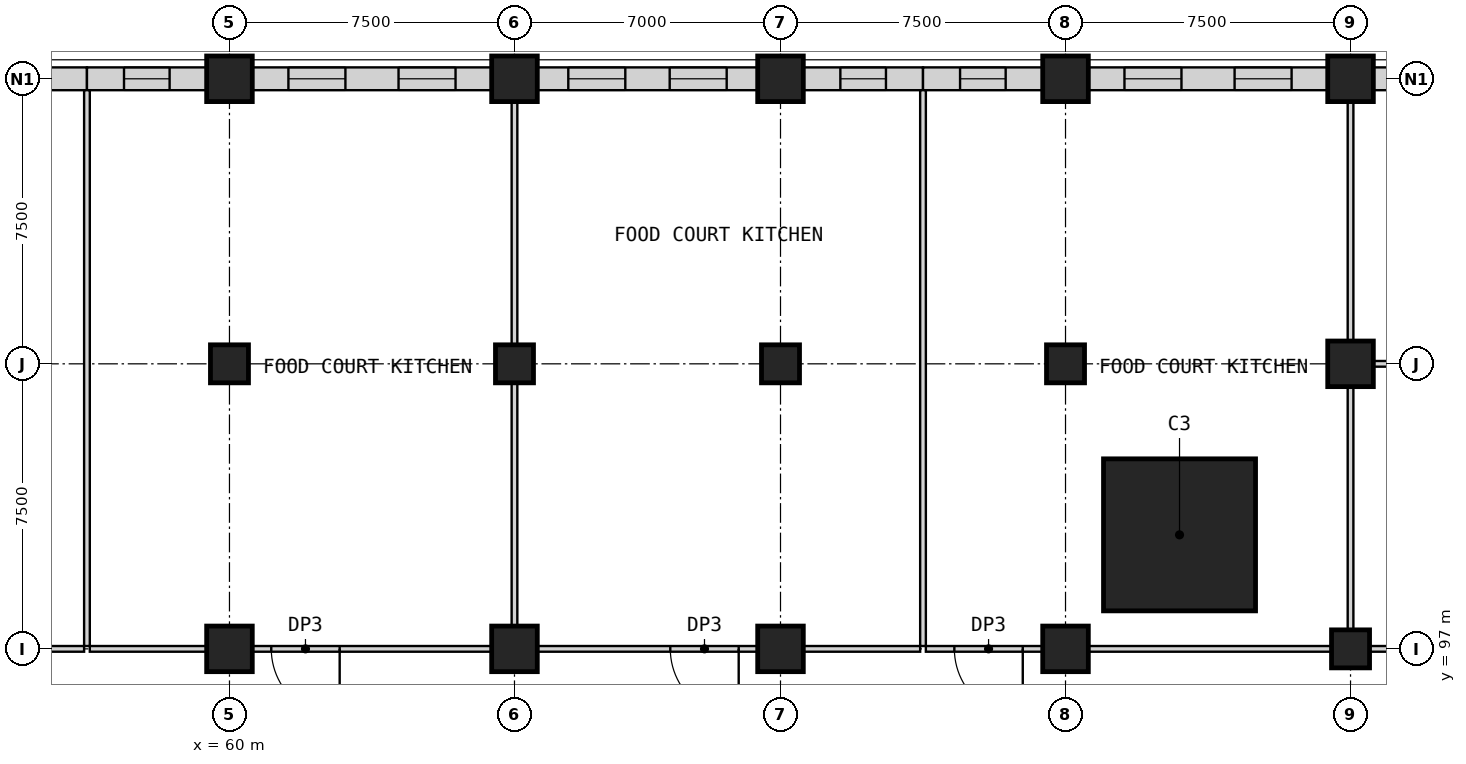
"""IFC4 building model, lengths in metres.
Left out: names, types, materials, properties, quantities, classifications, styles, units other than length and angle.
Written with IfcOpenShell. Run it as: python <this file> out.ifc"""

import sys

from ifc_helpers import new_model, si_unit, direction, frame, frame_2d, origin, origin_2d, place, context, subcontext, project, spatial, rectangle, extrude, element, fill, save


model = new_model("IFC4")
c1 = context("Model", 3, precision=1e-05, world=origin(), true_north=direction((0.0, 1.0)))
c2 = subcontext(c1, "Body", "Model", "MODEL_VIEW")
j1 = project(units=[si_unit("LENGTHUNIT", "METRE"), si_unit("PLANEANGLEUNIT", "RADIAN")], contexts=[c1])
p1 = place(None, origin())
s1 = spatial("IfcSite", under=j1, at=p1, CompositionType="ELEMENT")
p2 = place(p1, origin())
s2 = spatial("IfcBuilding", under=s1, at=p2, CompositionType="ELEMENT")
p3 = place(p2, frame((0.0, 0.0, 18.5)))
s3 = spatial("IfcBuildingStorey", under=s2, at=p3, CompositionType="ELEMENT", Elevation=18.5)
p4 = place(p3, frame((60.0, 97.0, 0.0), z_axis=(0.0, 0.0, 1.0), x_axis=(1.0, 0.0, 0.0)))
e1 = element("IfcColumn", 1, at=p4, inside=s3, PredefinedType="COLUMN", context=c2, shape_type="SweptSolid", body=[
    extrude(rectangle(XDim=1.2, YDim=1.2, at=origin_2d()), origin(), (0.0, 0.0, 1.0), 5.0),
])
p5 = place(p3, frame((60.0, 104.5, 0.0), z_axis=(0.0, 0.0, 1.0), x_axis=(1.0, 0.0, 0.0)))
e2 = element("IfcColumn", 2, at=p5, inside=s3, PredefinedType="COLUMN", context=c2, shape_type="SweptSolid", body=[
    extrude(rectangle(XDim=1.0, YDim=1.0, at=origin_2d()), origin(), (0.0, 0.0, 1.0), 5.0),
])
p6 = place(p3, frame((67.5, 97.0, 0.0), z_axis=(0.0, 0.0, 1.0), x_axis=(1.0, 0.0, 0.0)))
e3 = element("IfcColumn", 3, at=p6, inside=s3, PredefinedType="COLUMN", context=c2, shape_type="SweptSolid", body=[
    extrude(rectangle(XDim=1.2, YDim=1.2, at=origin_2d()), origin(), (0.0, 0.0, 1.0), 5.0),
])
p7 = place(p3, frame((67.5, 104.5, 0.0), z_axis=(0.0, 0.0, 1.0), x_axis=(1.0, 0.0, 0.0)))
e4 = element("IfcColumn", 4, at=p7, inside=s3, PredefinedType="COLUMN", context=c2, shape_type="SweptSolid", body=[
    extrude(rectangle(XDim=1.0, YDim=1.0, at=origin_2d()), origin(), (0.0, 0.0, 1.0), 5.0),
])
p8 = place(p3, frame((74.5, 97.0, 0.0), z_axis=(0.0, 0.0, 1.0), x_axis=(1.0, 0.0, 0.0)))
e5 = element("IfcColumn", 5, at=p8, inside=s3, PredefinedType="COLUMN", context=c2, shape_type="SweptSolid", body=[
    extrude(rectangle(XDim=1.2, YDim=1.2, at=origin_2d()), origin(), (0.0, 0.0, 1.0), 5.0),
])
p9 = place(p3, frame((74.5, 104.5, 0.0), z_axis=(0.0, 0.0, 1.0), x_axis=(1.0, 0.0, 0.0)))
e6 = element("IfcColumn", 6, at=p9, inside=s3, PredefinedType="COLUMN", context=c2, shape_type="SweptSolid", body=[
    extrude(rectangle(XDim=1.0, YDim=1.0, at=origin_2d()), origin(), (0.0, 0.0, 1.0), 5.0),
])
p10 = place(p3, frame((82.0, 97.0, 0.0), z_axis=(0.0, 0.0, 1.0), x_axis=(1.0, 0.0, 0.0)))
e7 = element("IfcColumn", 7, at=p10, inside=s3, PredefinedType="COLUMN", context=c2, shape_type="SweptSolid", body=[
    extrude(rectangle(XDim=1.2, YDim=1.2, at=origin_2d()), origin(), (0.0, 0.0, 1.0), 5.0),
])
for number, where, z_axis, x_axis in (
    (8, (82.0, 104.5, 0.0), (0.0, 0.0, 1.0), (1.0, 0.0, 0.0)),
    (9, (89.5, 97.0, 0.0), (0.0, 0.0, 1.0), (1.0, 0.0, 0.0)),
):
    element("IfcColumn", number, at=place(p3, frame(where, z_axis=z_axis, x_axis=x_axis)), inside=s3, PredefinedType="COLUMN", context=c2, shape_type="SweptSolid", body=[
        extrude(rectangle(XDim=1.0, YDim=1.0, at=origin_2d()), origin(), (0.0, 0.0, 1.0), 5.0),
    ])
p11 = place(p3, frame((85.0, 100.0, 0.0), z_axis=(0.0, 0.0, 1.0), x_axis=(1.0, 0.0, 0.0)))
e10 = element("IfcColumn", 10, at=p11, inside=s3, PredefinedType="COLUMN", context=c2, shape_type="SweptSolid", body=[
    extrude(rectangle(XDim=4.0, YDim=4.0, at=origin_2d()), origin(), (0.0, 0.0, 1.0), 5.0),
])
for number, where, z_axis, x_axis in (
    (11, (60.0, 112.0, 0.0), (0.0, 0.0, 1.0), (1.0, 0.0, 0.0)),
    (12, (67.5, 112.0, 0.0), (0.0, 0.0, 1.0), (1.0, 0.0, 0.0)),
    (13, (74.5, 112.0, 0.0), (0.0, 0.0, 1.0), (1.0, 0.0, 0.0)),
    (14, (82.0, 112.0, 0.0), (0.0, 0.0, 1.0), (1.0, 0.0, 0.0)),
    (15, (89.5, 104.5, 0.0), (0.0, 0.0, 1.0), (1.0, 0.0, 0.0)),
    (16, (89.5, 112.0, 0.0), (0.0, 0.0, 1.0), (1.0, 0.0, 0.0)),
):
    element("IfcColumn", number, at=place(p3, frame(where, z_axis=z_axis, x_axis=x_axis)), inside=s3, PredefinedType="COLUMN", context=c2, shape_type="SweptSolid", body=[
        extrude(rectangle(XDim=1.2, YDim=1.2, at=origin_2d()), origin(), (0.0, 0.0, 1.0), 5.0),
    ])
for number, where, z_axis, x_axis in (
    (17, (53.1, 97.0, 0.0), (0.0, 0.0, 1.0), (1.0, 0.0, 0.0)),
    (18, (56.325, 97.0, 0.0), (0.0, 0.0, 1.0), (1.0, 0.0, 0.0)),
):
    element("IfcWall", number, at=place(p3, frame(where, z_axis=z_axis, x_axis=x_axis)), inside=s3, PredefinedType="PARTITIONING", context=c2, shape_type="SweptSolid", body=[
        extrude(rectangle(XDim=3.075, YDim=0.15, at=frame_2d((1.538, 0.0))), origin(), (0.0, 0.0, 1.0), 4.7),
    ])
p12 = place(p3, frame((66.9, 97.0, 0.0), z_axis=(0.0, 0.0, 1.0), x_axis=(-1.0, 0.0, 0.0)))
e19 = element("IfcWall", 19, at=p12, inside=s3, PredefinedType="PARTITIONING", context=c2, shape_type="SweptSolid", body=[
    extrude(rectangle(XDim=6.3, YDim=0.15, at=frame_2d((3.15, 0.0))), origin(), (0.0, 0.0, 1.0), 4.7),
])
p13 = place(p12, frame((4.0, 0.0, 0.0)))
e20 = element("IfcOpeningElement", 20, at=p13, cuts=e19, PredefinedType="OPENING", context=c2, shape_type="SweptSolid", body=[
    extrude(rectangle(XDim=1.8, YDim=2.4, at=frame_2d((0.9, 1.2))), frame((0.0, 0.085, 0.0), z_axis=(0.0, -1.0, 0.0), x_axis=(1.0, 0.0, 0.0)), (0.0, 0.0, 1.0), 0.17),
])
p14 = place(p3, frame((73.9, 97.0, 0.0), z_axis=(0.0, 0.0, 1.0), x_axis=(-1.0, 0.0, 0.0)))
e21 = element("IfcWall", 21, at=p14, inside=s3, PredefinedType="PARTITIONING", context=c2, shape_type="SweptSolid", body=[
    extrude(rectangle(XDim=5.8, YDim=0.15, at=frame_2d((2.9, 0.0))), origin(), (0.0, 0.0, 1.0), 4.7),
])
p15 = place(p14, frame((0.5, 0.0, 0.0)))
e22 = element("IfcOpeningElement", 22, at=p15, cuts=e21, PredefinedType="OPENING", context=c2, shape_type="SweptSolid", body=[
    extrude(rectangle(XDim=1.8, YDim=2.4, at=frame_2d((0.9, 1.2))), frame((0.0, 0.085, 0.0), z_axis=(0.0, -1.0, 0.0), x_axis=(1.0, 0.0, 0.0)), (0.0, 0.0, 1.0), 0.17),
])
p16 = place(p3, frame((75.1, 97.0, 0.0), z_axis=(0.0, 0.0, 1.0), x_axis=(1.0, 0.0, 0.0)))
e23 = element("IfcWall", 23, at=p16, inside=s3, PredefinedType="PARTITIONING", context=c2, shape_type="SweptSolid", body=[
    extrude(rectangle(XDim=3.075, YDim=0.15, at=frame_2d((1.538, 0.0))), origin(), (0.0, 0.0, 1.0), 4.7),
])
p17 = place(p3, frame((81.4, 97.0, 0.0), z_axis=(0.0, 0.0, 1.0), x_axis=(-1.0, 0.0, 0.0)))
e24 = element("IfcWall", 24, at=p17, inside=s3, PredefinedType="PARTITIONING", context=c2, shape_type="SweptSolid", body=[
    extrude(rectangle(XDim=3.075, YDim=0.15, at=frame_2d((1.538, 0.0))), origin(), (0.0, 0.0, 1.0), 4.7),
])
p18 = place(p17, frame((0.525, 0.0, 0.0)))
e25 = element("IfcOpeningElement", 25, at=p18, cuts=e24, PredefinedType="OPENING", context=c2, shape_type="SweptSolid", body=[
    extrude(rectangle(XDim=1.8, YDim=2.4, at=frame_2d((0.9, 1.2))), frame((0.0, 0.085, 0.0), z_axis=(0.0, -1.0, 0.0), x_axis=(1.0, 0.0, 0.0)), (0.0, 0.0, 1.0), 0.17),
])
for number, where, z_axis, x_axis in (
    (26, (82.6, 97.0, 0.0), (0.0, 0.0, 1.0), (1.0, 0.0, 0.0)),
    (27, (90.0, 97.0, 0.0), (0.0, 0.0, 1.0), (1.0, 0.0, 0.0)),
):
    element("IfcWall", number, at=place(p3, frame(where, z_axis=z_axis, x_axis=x_axis)), inside=s3, PredefinedType="PARTITIONING", context=c2, shape_type="SweptSolid", body=[
        extrude(rectangle(XDim=6.4, YDim=0.15, at=frame_2d((3.2, 0.0))), origin(), (0.0, 0.0, 1.0), 4.7),
    ])
p19 = place(p3, frame((53.1, 112.0, 0.0), z_axis=(0.0, 0.0, 1.0), x_axis=(1.0, 0.0, 0.0)))
e28 = element("IfcWall", 28, at=p19, inside=s3, PredefinedType="PARTITIONING", context=c2, shape_type="SweptSolid", body=[
    extrude(rectangle(XDim=3.15, YDim=0.6, at=frame_2d((1.575, 0.0))), origin(), (0.0, 0.0, 1.0), 4.1),
])
p20 = place(p19, frame((0.975, 0.0, 0.9)))
e29 = element("IfcOpeningElement", 29, at=p20, cuts=e28, PredefinedType="OPENING", context=c2, shape_type="SweptSolid", body=[
    extrude(rectangle(XDim=1.2, YDim=2.8, at=frame_2d((0.6, 1.4))), frame((0.0, 0.31, 0.0), z_axis=(0.0, -1.0, 0.0), x_axis=(1.0, 0.0, 0.0)), (0.0, 0.0, 1.0), 0.62),
])
p21 = place(p3, frame((56.25, 112.0, 0.0), z_axis=(0.0, 0.0, 1.0), x_axis=(1.0, 0.0, 0.0)))
e30 = element("IfcWall", 30, at=p21, inside=s3, PredefinedType="PARTITIONING", context=c2, shape_type="SweptSolid", body=[
    extrude(rectangle(XDim=3.15, YDim=0.6, at=frame_2d((1.575, 0.0))), origin(), (0.0, 0.0, 1.0), 4.1),
])
p22 = place(p21, frame((0.975, 0.0, 0.9)))
e31 = element("IfcOpeningElement", 31, at=p22, cuts=e30, PredefinedType="OPENING", context=c2, shape_type="SweptSolid", body=[
    extrude(rectangle(XDim=1.2, YDim=2.8, at=frame_2d((0.6, 1.4))), frame((0.0, 0.31, 0.0), z_axis=(0.0, -1.0, 0.0), x_axis=(1.0, 0.0, 0.0)), (0.0, 0.0, 1.0), 0.62),
])
p23 = place(p3, frame((60.6, 112.0, 0.0), z_axis=(0.0, 0.0, 1.0), x_axis=(1.0, 0.0, 0.0)))
e32 = element("IfcWall", 32, at=p23, inside=s3, PredefinedType="PARTITIONING", context=c2, shape_type="SweptSolid", body=[
    extrude(rectangle(XDim=6.3, YDim=0.6, at=frame_2d((3.15, 0.0))), origin(), (0.0, 0.0, 1.0), 4.1),
])
p24 = place(p23, frame((0.951, 0.0, 0.9)))
e33 = element("IfcOpeningElement", 33, at=p24, cuts=e32, PredefinedType="OPENING", context=c2, shape_type="SweptSolid", body=[
    extrude(rectangle(XDim=1.5, YDim=2.8, at=frame_2d((0.75, 1.4))), frame((0.0, 0.31, 0.0), z_axis=(0.0, -1.0, 0.0), x_axis=(1.0, 0.0, 0.0)), (0.0, 0.0, 1.0), 0.62),
])
p25 = place(p23, frame((3.849, 0.0, 0.9)))
e34 = element("IfcOpeningElement", 34, at=p25, cuts=e32, PredefinedType="OPENING", context=c2, shape_type="SweptSolid", body=[
    extrude(rectangle(XDim=1.5, YDim=2.8, at=frame_2d((0.75, 1.4))), frame((0.0, 0.31, 0.0), z_axis=(0.0, -1.0, 0.0), x_axis=(1.0, 0.0, 0.0)), (0.0, 0.0, 1.0), 0.62),
])
p26 = place(p3, frame((68.1, 112.0, 0.0), z_axis=(0.0, 0.0, 1.0), x_axis=(1.0, 0.0, 0.0)))
e35 = element("IfcWall", 35, at=p26, inside=s3, PredefinedType="PARTITIONING", context=c2, shape_type="SweptSolid", body=[
    extrude(rectangle(XDim=5.8, YDim=0.6, at=frame_2d((2.9, 0.0))), origin(), (0.0, 0.0, 1.0), 4.1),
])
p27 = place(p26, frame((0.816, 0.0, 0.9)))
e36 = element("IfcOpeningElement", 36, at=p27, cuts=e35, PredefinedType="OPENING", context=c2, shape_type="SweptSolid", body=[
    extrude(rectangle(XDim=1.5, YDim=2.8, at=frame_2d((0.75, 1.4))), frame((0.0, 0.31, 0.0), z_axis=(0.0, -1.0, 0.0), x_axis=(1.0, 0.0, 0.0)), (0.0, 0.0, 1.0), 0.62),
])
p28 = place(p26, frame((3.484, 0.0, 0.9)))
e37 = element("IfcOpeningElement", 37, at=p28, cuts=e35, PredefinedType="OPENING", context=c2, shape_type="SweptSolid", body=[
    extrude(rectangle(XDim=1.5, YDim=2.8, at=frame_2d((0.75, 1.4))), frame((0.0, 0.31, 0.0), z_axis=(0.0, -1.0, 0.0), x_axis=(1.0, 0.0, 0.0)), (0.0, 0.0, 1.0), 0.62),
])
p29 = place(p3, frame((75.1, 112.0, 0.0), z_axis=(0.0, 0.0, 1.0), x_axis=(1.0, 0.0, 0.0)))
e38 = element("IfcWall", 38, at=p29, inside=s3, PredefinedType="PARTITIONING", context=c2, shape_type="SweptSolid", body=[
    extrude(rectangle(XDim=3.15, YDim=0.6, at=frame_2d((1.575, 0.0))), origin(), (0.0, 0.0, 1.0), 4.1),
])
p30 = place(p29, frame((0.975, 0.0, 0.9)))
e39 = element("IfcOpeningElement", 39, at=p30, cuts=e38, PredefinedType="OPENING", context=c2, shape_type="SweptSolid", body=[
    extrude(rectangle(XDim=1.2, YDim=2.8, at=frame_2d((0.6, 1.4))), frame((0.0, 0.31, 0.0), z_axis=(0.0, -1.0, 0.0), x_axis=(1.0, 0.0, 0.0)), (0.0, 0.0, 1.0), 0.62),
])
p31 = place(p3, frame((78.25, 112.0, 0.0), z_axis=(0.0, 0.0, 1.0), x_axis=(1.0, 0.0, 0.0)))
e40 = element("IfcWall", 40, at=p31, inside=s3, PredefinedType="PARTITIONING", context=c2, shape_type="SweptSolid", body=[
    extrude(rectangle(XDim=3.15, YDim=0.6, at=frame_2d((1.575, 0.0))), origin(), (0.0, 0.0, 1.0), 4.1),
])
p32 = place(p31, frame((0.975, 0.0, 0.9)))
e41 = element("IfcOpeningElement", 41, at=p32, cuts=e40, PredefinedType="OPENING", context=c2, shape_type="SweptSolid", body=[
    extrude(rectangle(XDim=1.2, YDim=2.8, at=frame_2d((0.6, 1.4))), frame((0.0, 0.31, 0.0), z_axis=(0.0, -1.0, 0.0), x_axis=(1.0, 0.0, 0.0)), (0.0, 0.0, 1.0), 0.62),
])
p33 = place(p3, frame((82.6, 112.0, 0.0), z_axis=(0.0, 0.0, 1.0), x_axis=(1.0, 0.0, 0.0)))
e42 = element("IfcWall", 42, at=p33, inside=s3, PredefinedType="PARTITIONING", context=c2, shape_type="SweptSolid", body=[
    extrude(rectangle(XDim=6.3, YDim=0.6, at=frame_2d((3.15, 0.0))), origin(), (0.0, 0.0, 1.0), 4.1),
])
p34 = place(p33, frame((0.951, 0.0, 0.9)))
e43 = element("IfcOpeningElement", 43, at=p34, cuts=e42, PredefinedType="OPENING", context=c2, shape_type="SweptSolid", body=[
    extrude(rectangle(XDim=1.5, YDim=2.8, at=frame_2d((0.75, 1.4))), frame((0.0, 0.31, 0.0), z_axis=(0.0, -1.0, 0.0), x_axis=(1.0, 0.0, 0.0)), (0.0, 0.0, 1.0), 0.62),
])
p35 = place(p33, frame((3.849, 0.0, 0.9)))
e44 = element("IfcOpeningElement", 44, at=p35, cuts=e42, PredefinedType="OPENING", context=c2, shape_type="SweptSolid", body=[
    extrude(rectangle(XDim=1.5, YDim=2.8, at=frame_2d((0.75, 1.4))), frame((0.0, 0.31, 0.0), z_axis=(0.0, -1.0, 0.0), x_axis=(1.0, 0.0, 0.0)), (0.0, 0.0, 1.0), 0.62),
])
p36 = place(p3, frame((90.1, 112.0, 0.0), z_axis=(0.0, 0.0, 1.0), x_axis=(1.0, 0.0, 0.0)))
e45 = element("IfcWall", 45, at=p36, inside=s3, PredefinedType="PARTITIONING", context=c2, shape_type="SweptSolid", body=[
    extrude(rectangle(XDim=6.3, YDim=0.6, at=frame_2d((3.15, 0.0))), origin(), (0.0, 0.0, 1.0), 4.1),
])
p37 = place(p36, frame((0.951, 0.0, 0.9)))
e46 = element("IfcOpeningElement", 46, at=p37, cuts=e45, PredefinedType="OPENING", context=c2, shape_type="SweptSolid", body=[
    extrude(rectangle(XDim=1.5, YDim=2.8, at=frame_2d((0.75, 1.4))), frame((0.0, 0.31, 0.0), z_axis=(0.0, -1.0, 0.0), x_axis=(1.0, 0.0, 0.0)), (0.0, 0.0, 1.0), 0.62),
])
p38 = place(p36, frame((3.849, 0.0, 0.9)))
e47 = element("IfcOpeningElement", 47, at=p38, cuts=e45, PredefinedType="OPENING", context=c2, shape_type="SweptSolid", body=[
    extrude(rectangle(XDim=1.5, YDim=2.8, at=frame_2d((0.75, 1.4))), frame((0.0, 0.31, 0.0), z_axis=(0.0, -1.0, 0.0), x_axis=(1.0, 0.0, 0.0)), (0.0, 0.0, 1.0), 0.62),
])
p39 = place(p3, frame((90.1, 104.5, 0.0), z_axis=(0.0, 0.0, 1.0), x_axis=(1.0, 0.0, 0.0)))
e48 = element("IfcWall", 48, at=p39, inside=s3, PredefinedType="PARTITIONING", context=c2, shape_type="SweptSolid", body=[
    extrude(rectangle(XDim=6.3, YDim=0.15, at=frame_2d((3.15, 0.0))), origin(), (0.0, 0.0, 1.0), 4.7),
])
p40 = place(p3, frame((56.25, 97.075, 0.0), z_axis=(0.0, 0.0, 1.0), x_axis=(0.0, 1.0, 0.0)))
e49 = element("IfcWall", 49, at=p40, inside=s3, PredefinedType="PARTITIONING", context=c2, shape_type="SweptSolid", body=[
    extrude(rectangle(XDim=14.625, YDim=0.15, at=frame_2d((7.312, 0.0))), origin(), (0.0, 0.0, 1.0), 4.7),
])
for number, where, z_axis, x_axis in (
    (50, (67.5, 97.6, 0.0), (0.0, 0.0, 1.0), (0.0, 1.0, 0.0)),
    (51, (67.5, 105.0, 0.0), (0.0, 0.0, 1.0), (0.0, 1.0, 0.0)),
):
    element("IfcWall", number, at=place(p3, frame(where, z_axis=z_axis, x_axis=x_axis)), inside=s3, PredefinedType="PARTITIONING", context=c2, shape_type="SweptSolid", body=[
        extrude(rectangle(XDim=6.4, YDim=0.15, at=frame_2d((3.2, 0.0))), origin(), (0.0, 0.0, 1.0), 4.7),
    ])
p41 = place(p3, frame((78.25, 97.075, 0.0), z_axis=(0.0, 0.0, 1.0), x_axis=(0.0, 1.0, 0.0)))
e52 = element("IfcWall", 52, at=p41, inside=s3, PredefinedType="PARTITIONING", context=c2, shape_type="SweptSolid", body=[
    extrude(rectangle(XDim=14.625, YDim=0.15, at=frame_2d((7.312, 0.0))), origin(), (0.0, 0.0, 1.0), 4.7),
])
p42 = place(p3, frame((89.5, 97.5, 0.0), z_axis=(0.0, 0.0, 1.0), x_axis=(0.0, 1.0, 0.0)))
e53 = element("IfcWall", 53, at=p42, inside=s3, PredefinedType="PARTITIONING", context=c2, shape_type="SweptSolid", body=[
    extrude(rectangle(XDim=6.4, YDim=0.15, at=frame_2d((3.2, 0.0))), origin(), (0.0, 0.0, 1.0), 4.7),
])
p43 = place(p3, frame((89.5, 105.1, 0.0), z_axis=(0.0, 0.0, 1.0), x_axis=(0.0, 1.0, 0.0)))
e54 = element("IfcWall", 54, at=p43, inside=s3, PredefinedType="PARTITIONING", context=c2, shape_type="SweptSolid", body=[
    extrude(rectangle(XDim=6.3, YDim=0.15, at=frame_2d((3.15, 0.0))), origin(), (0.0, 0.0, 1.0), 4.7),
])
p44 = place(p13, origin())
e55 = element("IfcDoor", 55, at=p44, inside=s3, OperationType="SINGLE_SWING_LEFT", PredefinedType="DOOR", context=c2, shape_type="SweptSolid", body=[
    extrude(rectangle(XDim=1.8, YDim=2.4, at=frame_2d((0.9, 1.2))), frame((0.0, 0.025, 0.0), z_axis=(0.0, -1.0, 0.0), x_axis=(1.0, 0.0, 0.0)), (0.0, 0.0, 1.0), 0.05),
])
fill(e20, e55)
p45 = place(p15, origin())
e56 = element("IfcDoor", 56, at=p45, inside=s3, OperationType="SINGLE_SWING_LEFT", PredefinedType="DOOR", context=c2, shape_type="SweptSolid", body=[
    extrude(rectangle(XDim=1.8, YDim=2.4, at=frame_2d((0.9, 1.2))), frame((0.0, 0.025, 0.0), z_axis=(0.0, -1.0, 0.0), x_axis=(1.0, 0.0, 0.0)), (0.0, 0.0, 1.0), 0.05),
])
fill(e22, e56)
p46 = place(p18, origin())
e57 = element("IfcDoor", 57, at=p46, inside=s3, OperationType="SINGLE_SWING_LEFT", PredefinedType="DOOR", context=c2, shape_type="SweptSolid", body=[
    extrude(rectangle(XDim=1.8, YDim=2.4, at=frame_2d((0.9, 1.2))), frame((0.0, 0.025, 0.0), z_axis=(0.0, -1.0, 0.0), x_axis=(1.0, 0.0, 0.0)), (0.0, 0.0, 1.0), 0.05),
])
fill(e25, e57)
p47 = place(p22, origin())
e58 = element("IfcWindow", 58, at=p47, inside=s3, PartitioningType="SINGLE_PANEL", PredefinedType="WINDOW", context=c2, shape_type="SweptSolid", body=[
    extrude(rectangle(XDim=1.2, YDim=2.8, at=frame_2d((0.6, 1.4))), frame((0.0, 0.03, 0.0), z_axis=(0.0, -1.0, 0.0), x_axis=(1.0, 0.0, 0.0)), (0.0, 0.0, 1.0), 0.06),
])
fill(e31, e58)
p48 = place(p24, origin())
e59 = element("IfcWindow", 59, at=p48, inside=s3, PartitioningType="SINGLE_PANEL", PredefinedType="WINDOW", context=c2, shape_type="SweptSolid", body=[
    extrude(rectangle(XDim=1.5, YDim=2.8, at=frame_2d((0.75, 1.4))), frame((0.0, 0.03, 0.0), z_axis=(0.0, -1.0, 0.0), x_axis=(1.0, 0.0, 0.0)), (0.0, 0.0, 1.0), 0.06),
])
fill(e33, e59)
p49 = place(p25, origin())
e60 = element("IfcWindow", 60, at=p49, inside=s3, PartitioningType="SINGLE_PANEL", PredefinedType="WINDOW", context=c2, shape_type="SweptSolid", body=[
    extrude(rectangle(XDim=1.5, YDim=2.8, at=frame_2d((0.75, 1.4))), frame((0.0, 0.03, 0.0), z_axis=(0.0, -1.0, 0.0), x_axis=(1.0, 0.0, 0.0)), (0.0, 0.0, 1.0), 0.06),
])
fill(e34, e60)
p50 = place(p27, origin())
e61 = element("IfcWindow", 61, at=p50, inside=s3, PartitioningType="SINGLE_PANEL", PredefinedType="WINDOW", context=c2, shape_type="SweptSolid", body=[
    extrude(rectangle(XDim=1.5, YDim=2.8, at=frame_2d((0.75, 1.4))), frame((0.0, 0.03, 0.0), z_axis=(0.0, -1.0, 0.0), x_axis=(1.0, 0.0, 0.0)), (0.0, 0.0, 1.0), 0.06),
])
fill(e36, e61)
p51 = place(p28, origin())
e62 = element("IfcWindow", 62, at=p51, inside=s3, PartitioningType="SINGLE_PANEL", PredefinedType="WINDOW", context=c2, shape_type="SweptSolid", body=[
    extrude(rectangle(XDim=1.5, YDim=2.8, at=frame_2d((0.75, 1.4))), frame((0.0, 0.03, 0.0), z_axis=(0.0, -1.0, 0.0), x_axis=(1.0, 0.0, 0.0)), (0.0, 0.0, 1.0), 0.06),
])
fill(e37, e62)
p52 = place(p30, origin())
e63 = element("IfcWindow", 63, at=p52, inside=s3, PartitioningType="SINGLE_PANEL", PredefinedType="WINDOW", context=c2, shape_type="SweptSolid", body=[
    extrude(rectangle(XDim=1.2, YDim=2.8, at=frame_2d((0.6, 1.4))), frame((0.0, 0.03, 0.0), z_axis=(0.0, -1.0, 0.0), x_axis=(1.0, 0.0, 0.0)), (0.0, 0.0, 1.0), 0.06),
])
fill(e39, e63)
p53 = place(p32, origin())
e64 = element("IfcWindow", 64, at=p53, inside=s3, PartitioningType="SINGLE_PANEL", PredefinedType="WINDOW", context=c2, shape_type="SweptSolid", body=[
    extrude(rectangle(XDim=1.2, YDim=2.8, at=frame_2d((0.6, 1.4))), frame((0.0, 0.03, 0.0), z_axis=(0.0, -1.0, 0.0), x_axis=(1.0, 0.0, 0.0)), (0.0, 0.0, 1.0), 0.06),
])
fill(e41, e64)
p54 = place(p34, origin())
e65 = element("IfcWindow", 65, at=p54, inside=s3, PartitioningType="SINGLE_PANEL", PredefinedType="WINDOW", context=c2, shape_type="SweptSolid", body=[
    extrude(rectangle(XDim=1.5, YDim=2.8, at=frame_2d((0.75, 1.4))), frame((0.0, 0.03, 0.0), z_axis=(0.0, -1.0, 0.0), x_axis=(1.0, 0.0, 0.0)), (0.0, 0.0, 1.0), 0.06),
])
fill(e43, e65)
p55 = place(p35, origin())
e66 = element("IfcWindow", 66, at=p55, inside=s3, PartitioningType="SINGLE_PANEL", PredefinedType="WINDOW", context=c2, shape_type="SweptSolid", body=[
    extrude(rectangle(XDim=1.5, YDim=2.8, at=frame_2d((0.75, 1.4))), frame((0.0, 0.03, 0.0), z_axis=(0.0, -1.0, 0.0), x_axis=(1.0, 0.0, 0.0)), (0.0, 0.0, 1.0), 0.06),
])
fill(e44, e66)
save(model, sys.argv[1])
